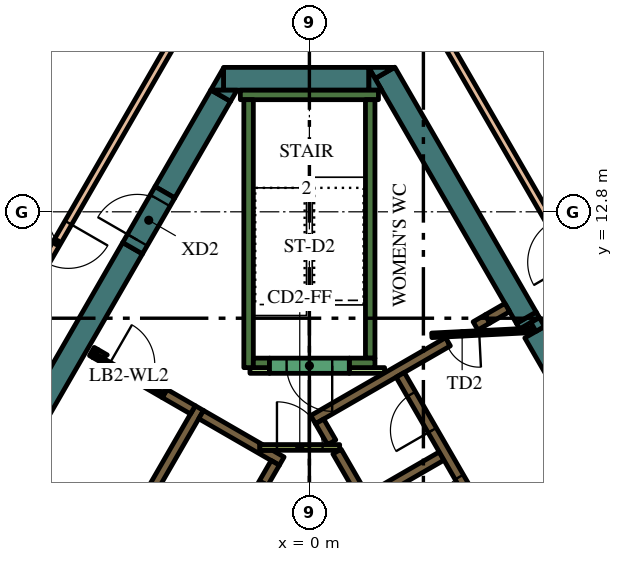
"""IFC4 building model, lengths in metres.
Left out: names, types, materials, properties, quantities, classifications, styles, units other than length and angle.
Written with IfcOpenShell. Run it as: python <this file> out.ifc"""

import sys

from ifc_helpers import new_model, si_unit, direction, frame, frame_2d, origin, place, context, subcontext, project, spatial, polyline, rectangle, outline, extrude, element, fill, save


model = new_model("IFC4")
c1 = context("Model", 3, precision=1e-05, world=origin(), true_north=direction((0.0, 1.0)))
c2 = subcontext(c1, "Body", "Model", "MODEL_VIEW")
j1 = project(units=[si_unit("LENGTHUNIT", "METRE"), si_unit("PLANEANGLEUNIT", "RADIAN")], contexts=[c1])
p1 = place(None, origin())
s1 = spatial("IfcSite", under=j1, at=p1, CompositionType="ELEMENT")
p2 = place(p1, origin())
s2 = spatial("IfcBuilding", under=s1, at=p2, CompositionType="ELEMENT")
p3 = place(p2, frame((0.0, 0.0, 336.0)))
s3 = spatial("IfcBuildingStorey", under=s2, at=p3, CompositionType="ELEMENT", Elevation=336.0)
p4 = place(p3, frame((5.709, 10.012, 0.0), z_axis=(0.0, 0.0, 1.0), x_axis=(0.500399834964, -0.865794435861, 0.0)))
e1 = element("IfcWall", 1, at=p4, inside=s3, PredefinedType="SOLIDWALL", context=c2, shape_type="SweptSolid", body=[
    extrude(rectangle(XDim=0.166, YDim=0.6, at=frame_2d((0.083, 0.0))), origin(), (0.0, 0.0, 1.0), 4.2),
])
p5 = place(p3, frame((5.928, 9.633, 0.0), z_axis=(0.0, 0.0, 1.0), x_axis=(0.499983823482, -0.8660347431, 0.0)))
e2 = element("IfcWall", 2, at=p5, inside=s3, PredefinedType="SOLIDWALL", context=c2, shape_type="SweptSolid", body=[
    extrude(rectangle(XDim=4.528, YDim=0.6, at=frame_2d((2.264, 0.0))), origin(), (0.0, 0.0, 1.0), 4.2),
])
p6 = place(p3, origin())
e3 = element("IfcWall", 3, at=p6, inside=s3, PredefinedType="SOLIDWALL", context=c2, shape_type="SweptSolid", body=[
    extrude(outline(polyline([(6.053, 10.016), (6.187, 9.784), (5.961, 9.654), (5.827, 9.886), (6.053, 10.016)])), origin(), (0.0, 0.0, 1.0), 4.2),
])
p7 = place(p3, frame((1.989, 16.456, 0.0), z_axis=(0.0, 0.0, 1.0), x_axis=(0.499990476767, -0.866030901956, 0.0)))
e4 = element("IfcWall", 4, at=p7, inside=s3, PredefinedType="SOLIDWALL", context=c2, shape_type="SweptSolid", body=[
    extrude(rectangle(XDim=7.438, YDim=0.6, at=frame_2d((3.719, 0.0))), origin(), (0.0, 0.0, 1.0), 4.2),
])
e5 = element("IfcWall", 5, at=p6, inside=s3, PredefinedType="SOLIDWALL", context=c2, shape_type="SweptSolid", body=[
    extrude(outline(polyline([(1.559, 16.6), (2.235, 16.6), (1.728, 16.307), (1.559, 16.6)])), origin(), (0.0, 0.0, 1.0), 4.2),
])
p8 = place(p3, frame((-2.258, 16.3, 0.0), z_axis=(0.0, 0.0, 1.0), x_axis=(1.0, 0.0, 0.0)))
e6 = element("IfcWall", 6, at=p8, inside=s3, PredefinedType="SOLIDWALL", context=c2, shape_type="SweptSolid", body=[
    extrude(rectangle(XDim=3.823, YDim=0.6, at=frame_2d((1.912, 0.0))), origin(), (0.0, 0.0, 1.0), 4.2),
])
e7 = element("IfcWall", 7, at=p6, inside=s3, PredefinedType="SOLIDWALL", context=c2, shape_type="SweptSolid", body=[
    extrude(outline(polyline([(1.905, 16.0), (1.567, 16.0), (1.567, 16.585), (1.905, 16.0)])), origin(), (0.0, 0.0, 1.0), 4.2),
])
e8 = element("IfcWall", 8, at=p6, inside=s3, PredefinedType="SOLIDWALL", context=c2, shape_type="SweptSolid", body=[
    extrude(outline(polyline([(-2.598, 16.0), (-2.26, 16.585), (-2.26, 16.0), (-2.598, 16.0)])), origin(), (0.0, 0.0, 1.0), 4.2),
])
p9 = place(p3, frame((-2.335, 15.855, 0.0), z_axis=(0.0, 0.0, 1.0), x_axis=(-0.499960127962, -0.866048422692, 0.0)))
e9 = element("IfcWall", 9, at=p9, inside=s3, PredefinedType="SOLIDWALL", context=c2, shape_type="SweptSolid", body=[
    extrude(rectangle(XDim=2.934, YDim=0.6, at=frame_2d((1.467, 0.0))), origin(), (0.0, 0.0, 1.0), 4.2),
])
e10 = element("IfcWall", 10, at=p6, inside=s3, PredefinedType="SOLIDWALL", context=c2, shape_type="SweptSolid", body=[
    extrude(outline(polyline([(-1.905, 16.0), (-2.074, 15.707), (-2.581, 16.0), (-1.905, 16.0)])), origin(), (0.0, 0.0, 1.0), 4.2),
])
p10 = place(p3, frame((-4.652, 11.842, 0.0), z_axis=(0.0, 0.0, 1.0), x_axis=(-0.500003640647, -0.866023301845, 0.0)))
e11 = element("IfcWall", 11, at=p10, inside=s3, PredefinedType="SOLIDWALL", context=c2, shape_type="SweptSolid", body=[
    extrude(rectangle(XDim=15.858, YDim=0.6, at=frame_2d((7.929, 0.0))), origin(), (0.0, 0.0, 1.0), 4.2),
])
p11 = place(p3, frame((-1.817, 15.875, 0.0), z_axis=(0.0, 0.0, 1.0), x_axis=(1.0, 0.0, 0.0)))
e12 = element("IfcWall", 12, at=p11, inside=s3, PredefinedType="SOLIDWALL", context=c2, shape_type="SweptSolid", body=[
    extrude(rectangle(XDim=3.634, YDim=0.25, at=frame_2d((1.817, 0.0))), origin(), (0.0, 0.0, 1.0), 4.2),
])
p12 = place(p3, frame((1.6, 8.95, 0.0), z_axis=(0.0, 0.0, 1.0), x_axis=(0.0, 1.0, 0.0)))
e13 = element("IfcWall", 13, at=p12, inside=s3, PredefinedType="SOLIDWALL", context=c2, shape_type="SweptSolid", body=[
    extrude(rectangle(XDim=6.8, YDim=0.25, at=frame_2d((3.4, 0.0))), origin(), (0.0, 0.0, 1.0), 4.2),
])
p13 = place(p3, frame((1.05, 8.825, 0.0), z_axis=(0.0, 0.0, 1.0), x_axis=(1.0, 0.0, 0.0)))
e14 = element("IfcWall", 14, at=p13, inside=s3, PredefinedType="SOLIDWALL", context=c2, shape_type="SweptSolid", body=[
    extrude(rectangle(XDim=0.675, YDim=0.25, at=frame_2d((0.337, 0.0))), origin(), (0.0, 0.0, 1.0), 4.2),
])
p14 = place(p3, frame((-1.6, 8.7, 0.0), z_axis=(0.0, 0.0, 1.0), x_axis=(0.0, 1.0, 0.0)))
e15 = element("IfcWall", 15, at=p14, inside=s3, PredefinedType="SOLIDWALL", context=c2, shape_type="SweptSolid", body=[
    extrude(rectangle(XDim=7.05, YDim=0.25, at=frame_2d((3.525, 0.0))), origin(), (0.0, 0.0, 1.0), 4.2),
])
p15 = place(p3, frame((-1.475, 8.825, 0.0), z_axis=(0.0, 0.0, 1.0), x_axis=(1.0, 0.0, 0.0)))
e16 = element("IfcWall", 16, at=p15, inside=s3, PredefinedType="SOLIDWALL", context=c2, shape_type="SweptSolid", body=[
    extrude(rectangle(XDim=0.425, YDim=0.25, at=frame_2d((0.212, 0.0))), origin(), (0.0, 0.0, 1.0), 4.2),
])
p16 = place(p3, frame((3.647, 9.38, 0.0), z_axis=(0.0, 0.0, 1.0), x_axis=(-0.866027868628, -0.499995730742, 0.0)))
e17 = element("IfcWall", 17, at=p16, inside=s3, PredefinedType="SOLIDWALL", context=c2, shape_type="SweptSolid", body=[
    extrude(rectangle(XDim=4.099, YDim=0.25, at=frame_2d((2.049, 0.0))), origin(), (0.0, 0.0, 1.0), 4.2),
])
p17 = place(p3, frame((0.268, 7.285, 0.0), z_axis=(0.0, 0.0, 1.0), x_axis=(0.500098681536, -0.865968422476, 0.0)))
e18 = element("IfcWall", 18, at=p17, inside=s3, PredefinedType="SOLIDWALL", context=c2, shape_type="SweptSolid", body=[
    extrude(rectangle(XDim=0.636, YDim=0.25, at=frame_2d((0.318, 0.0))), origin(), (0.0, 0.0, 1.0), 4.2),
])
p18 = place(p3, frame((5.97, -2.591, 0.0), z_axis=(0.0, 0.0, 1.0), x_axis=(-0.499994469932, 0.866028596547, 0.0)))
e19 = element("IfcWall", 19, at=p18, inside=s3, PredefinedType="SOLIDWALL", context=c2, shape_type="SweptSolid", body=[
    extrude(rectangle(XDim=10.488, YDim=0.25, at=frame_2d((5.244, 0.0))), origin(), (0.0, 0.0, 1.0), 4.2),
])
p19 = place(p3, frame((1.574, 5.274, 0.0), z_axis=(0.0, 0.0, 1.0), x_axis=(0.866028486751, 0.499994660107, 0.0)))
e20 = element("IfcWall", 20, at=p19, inside=s3, PredefinedType="SOLIDWALL", context=c2, shape_type="SweptSolid", body=[
    extrude(rectangle(XDim=2.2, YDim=0.25, at=frame_2d((1.1, 0.0))), origin(), (0.0, 0.0, 1.0), 4.2),
])
p20 = place(p3, frame((4.688, 9.981, 0.0), z_axis=(0.0, 0.0, 1.0), x_axis=(-0.865974312977, -0.500088481434, 0.0)))
e21 = element("IfcWall", 21, at=p20, inside=s3, PredefinedType="SOLIDWALL", context=c2, shape_type="SweptSolid", body=[
    extrude(rectangle(XDim=0.366, YDim=0.25, at=frame_2d((0.183, 0.0))), origin(), (0.0, 0.0, 1.0), 4.2),
])
p21 = place(p3, frame((4.689, 9.982, 0.0), z_axis=(0.0, 0.0, 1.0), x_axis=(0.865947592822, 0.500134748329, 0.0)))
e22 = element("IfcWall", 22, at=p21, inside=s3, PredefinedType="SOLIDWALL", context=c2, shape_type="SweptSolid", body=[
    extrude(rectangle(XDim=0.598, YDim=0.25, at=frame_2d((0.299, 0.0))), origin(), (0.0, 0.0, 1.0), 4.2),
])
p22 = place(p3, frame((-8.06, -1.311, 0.0), z_axis=(0.0, 0.0, 1.0), x_axis=(0.50000273126, 0.866023826885, 0.0)))
e23 = element("IfcWall", 23, at=p22, inside=s3, PredefinedType="SOLIDWALL", context=c2, shape_type="SweptSolid", body=[
    extrude(rectangle(XDim=10.33, YDim=0.25, at=frame_2d((5.165, 0.0))), origin(), (0.0, 0.0, 1.0), 4.2),
])
e24 = element("IfcWall", 24, at=p6, inside=s3, PredefinedType="SOLIDWALL", context=c2, shape_type="SweptSolid", body=[
    extrude(outline(polyline([(-2.912, 7.356), (-2.787, 7.573), (-1.232, 6.675), (-1.303, 6.675), (-1.304, 6.675), (-1.304, 6.675), (-1.304, 6.525), (-1.304, 6.525), (-1.303, 6.525), (-0.971, 6.525), (-0.665, 6.348), (-0.79, 6.132), (-1.007, 6.257), (-1.007, 6.257), (-2.912, 7.356)])), origin(), (0.0, 0.0, 1.0), 4.2),
])
p23 = place(p3, frame((-5.725, 9.125, 0.0), z_axis=(0.0, 0.0, 1.0), x_axis=(0.866185586049, -0.49972245349, 0.0)))
e25 = element("IfcWall", 25, at=p23, inside=s3, PredefinedType="SOLIDWALL", context=c2, shape_type="SweptSolid", body=[
    extrude(rectangle(XDim=0.11, YDim=0.25, at=frame_2d((0.055, 0.0))), origin(), (0.0, 0.0, 1.0), 4.2),
])
p24 = place(p3, frame((-3.066, 7.59, 0.0), z_axis=(0.0, 0.0, 1.0), x_axis=(-0.866081358704, 0.49990307071, 0.0)))
e26 = element("IfcWall", 26, at=p24, inside=s3, PredefinedType="SOLIDWALL", context=c2, shape_type="SweptSolid", body=[
    extrude(rectangle(XDim=0.858, YDim=0.25, at=frame_2d((0.429, 0.0))), origin(), (0.0, 0.0, 1.0), 4.2),
])
e27 = element("IfcWall", 27, at=p6, inside=s3, PredefinedType="SOLIDWALL", context=c2, shape_type="SweptSolid", body=[
    extrude(outline(polyline([(-3.748, 8.128), (-3.813, 8.015), (-4.027, 8.139), (-4.017, 8.156), (-4.008, 8.173), (-4.0, 8.192), (-3.995, 8.21), (-3.991, 8.23), (-3.99, 8.25), (-3.99, 8.268), (-3.748, 8.128)])), origin(), (0.0, 0.0, 1.0), 4.2),
])
e28 = element("IfcWall", 28, at=p6, inside=s3, PredefinedType="SOLIDWALL", context=c2, shape_type="SweptSolid", body=[
    extrude(outline(polyline([(-5.689, 8.96), (-5.69, 8.961), (-5.565, 9.177), (-5.319, 9.035), (-5.335, 9.026), (-5.351, 9.015), (-5.366, 9.002), (-5.379, 8.988), (-5.392, 8.972), (-5.402, 8.956), (-5.412, 8.939), (-5.629, 9.064), (-5.629, 9.064), (-5.689, 8.96)])), origin(), (0.0, 0.0, 1.0), 4.2),
])
p25 = place(p3, frame((1.05, 8.625, 0.0), z_axis=(0.0, 0.0, 1.0), x_axis=(1.0, 0.0, 0.0)))
e29 = element("IfcWall", 29, at=p25, inside=s3, PredefinedType="PARTITIONING", context=c2, shape_type="SweptSolid", body=[
    extrude(rectangle(XDim=0.929, YDim=0.15, at=frame_2d((0.464, 0.0))), origin(), (0.0, 0.0, 1.0), 3.45),
])
p26 = place(p3, frame((-1.564, 8.625, 0.0), z_axis=(0.0, 0.0, 1.0), x_axis=(1.0, 0.0, 0.0)))
e30 = element("IfcWall", 30, at=p26, inside=s3, PredefinedType="PARTITIONING", context=c2, shape_type="SweptSolid", body=[
    extrude(rectangle(XDim=0.514, YDim=0.15, at=frame_2d((0.257, 0.0))), origin(), (0.0, 0.0, 1.0), 3.45),
])
p27 = place(p3, frame((8.565, -2.185, 0.0), z_axis=(0.0, 0.0, 1.0), x_axis=(-0.499997954832, 0.866026584559, 0.0)))
e31 = element("IfcWall", 31, at=p27, inside=s3, PredefinedType="SOLIDWALL", context=c2, shape_type="SweptSolid", body=[
    extrude(rectangle(XDim=12.35, YDim=0.25, at=frame_2d((6.175, 0.0))), origin(), (0.0, 0.0, 1.0), 4.2),
])
p28 = place(p27, frame((0.685, 0.0, 0.0)))
e32 = element("IfcOpeningElement", 32, at=p28, cuts=e31, PredefinedType="OPENING", context=c2, shape_type="SweptSolid", body=[
    extrude(rectangle(XDim=0.9, YDim=2.1, at=frame_2d((0.45, 1.05))), frame((0.0, 0.135, 0.0), z_axis=(0.0, -1.0, 0.0), x_axis=(1.0, 0.0, 0.0)), (0.0, 0.0, 1.0), 0.27),
])
p29 = place(p27, frame((3.105, 0.0, 0.0)))
e33 = element("IfcOpeningElement", 33, at=p29, cuts=e31, PredefinedType="OPENING", context=c2, shape_type="SweptSolid", body=[
    extrude(rectangle(XDim=1.1, YDim=2.1, at=frame_2d((0.55, 1.05))), frame((0.0, 0.135, 0.0), z_axis=(0.0, -1.0, 0.0), x_axis=(1.0, 0.0, 0.0)), (0.0, 0.0, 1.0), 0.27),
])
p30 = place(p27, frame((5.625, 0.0, 0.0)))
e34 = element("IfcOpeningElement", 34, at=p30, cuts=e31, PredefinedType="OPENING", context=c2, shape_type="SweptSolid", body=[
    extrude(rectangle(XDim=1.1, YDim=2.1, at=frame_2d((0.55, 1.05))), frame((0.0, 0.135, 0.0), z_axis=(0.0, -1.0, 0.0), x_axis=(1.0, 0.0, 0.0)), (0.0, 0.0, 1.0), 0.27),
])
p31 = place(p27, frame((8.145, 0.0, 0.0)))
e35 = element("IfcOpeningElement", 35, at=p31, cuts=e31, PredefinedType="OPENING", context=c2, shape_type="SweptSolid", body=[
    extrude(rectangle(XDim=1.1, YDim=2.1, at=frame_2d((0.55, 1.05))), frame((0.0, 0.135, 0.0), z_axis=(0.0, -1.0, 0.0), x_axis=(1.0, 0.0, 0.0)), (0.0, 0.0, 1.0), 0.27),
])
p32 = place(p27, frame((10.665, 0.0, 0.0)))
e36 = element("IfcOpeningElement", 36, at=p32, cuts=e31, PredefinedType="OPENING", context=c2, shape_type="SweptSolid", body=[
    extrude(rectangle(XDim=1.1, YDim=2.1, at=frame_2d((0.55, 1.05))), frame((0.0, 0.135, 0.0), z_axis=(0.0, -1.0, 0.0), x_axis=(1.0, 0.0, 0.0)), (0.0, 0.0, 1.0), 0.27),
])
p33 = place(p3, frame((-0.898, 6.194, 0.0), z_axis=(0.0, 0.0, 1.0), x_axis=(-0.499996202215, -0.866027596426, 0.0)))
e37 = element("IfcWall", 37, at=p33, inside=s3, PredefinedType="SOLIDWALL", context=c2, shape_type="SweptSolid", body=[
    extrude(rectangle(XDim=9.83, YDim=0.25, at=frame_2d((4.915, 0.0))), origin(), (0.0, 0.0, 1.0), 4.2),
])
p34 = place(p33, frame((0.585, 0.0, 0.0)))
e38 = element("IfcOpeningElement", 38, at=p34, cuts=e37, PredefinedType="OPENING", context=c2, shape_type="SweptSolid", body=[
    extrude(rectangle(XDim=1.1, YDim=2.1, at=frame_2d((0.55, 1.05))), frame((0.0, 0.135, 0.0), z_axis=(0.0, -1.0, 0.0), x_axis=(1.0, 0.0, 0.0)), (0.0, 0.0, 1.0), 0.27),
])
p35 = place(p33, frame((3.105, 0.0, 0.0)))
e39 = element("IfcOpeningElement", 39, at=p35, cuts=e37, PredefinedType="OPENING", context=c2, shape_type="SweptSolid", body=[
    extrude(rectangle(XDim=1.1, YDim=2.1, at=frame_2d((0.55, 1.05))), frame((0.0, 0.135, 0.0), z_axis=(0.0, -1.0, 0.0), x_axis=(1.0, 0.0, 0.0)), (0.0, 0.0, 1.0), 0.27),
])
p36 = place(p33, frame((5.625, 0.0, 0.0)))
e40 = element("IfcOpeningElement", 40, at=p36, cuts=e37, PredefinedType="OPENING", context=c2, shape_type="SweptSolid", body=[
    extrude(rectangle(XDim=1.1, YDim=2.1, at=frame_2d((0.55, 1.05))), frame((0.0, 0.135, 0.0), z_axis=(0.0, -1.0, 0.0), x_axis=(1.0, 0.0, 0.0)), (0.0, 0.0, 1.0), 0.27),
])
p37 = place(p33, frame((8.145, 0.0, 0.0)))
e41 = element("IfcOpeningElement", 41, at=p37, cuts=e37, PredefinedType="OPENING", context=c2, shape_type="SweptSolid", body=[
    extrude(rectangle(XDim=1.1, YDim=2.1, at=frame_2d((0.55, 1.05))), frame((0.0, 0.135, 0.0), z_axis=(0.0, -1.0, 0.0), x_axis=(1.0, 0.0, 0.0)), (0.0, 0.0, 1.0), 0.27),
])
p38 = place(p3, frame((1.05, 8.75, 0.0), z_axis=(0.0, 0.0, 1.0), x_axis=(-1.0, 0.0, 0.0)))
e42 = element("IfcWall", 42, at=p38, inside=s3, PredefinedType="SOLIDWALL", context=c2, shape_type="SweptSolid", body=[
    extrude(rectangle(XDim=2.1, YDim=0.4, at=frame_2d((1.05, 0.0))), origin(), (0.0, 0.0, 1.0), 4.2),
])
p39 = place(p38, frame((0.45, 0.0, 0.0)))
e43 = element("IfcOpeningElement", 43, at=p39, cuts=e42, PredefinedType="OPENING", context=c2, shape_type="SweptSolid", body=[
    extrude(rectangle(XDim=1.2, YDim=2.1, at=frame_2d((0.6, 1.05))), frame((0.0, 0.21, 0.0), z_axis=(0.0, -1.0, 0.0), x_axis=(1.0, 0.0, 0.0)), (0.0, 0.0, 1.0), 0.42),
])
p40 = place(p3, frame((5.917, 9.684, 0.0), z_axis=(0.0, 0.0, 1.0), x_axis=(-0.998758194515, -0.049820366212, 0.0)))
e44 = element("IfcWall", 44, at=p40, inside=s3, PredefinedType="PARTITIONING", context=c2, shape_type="SweptSolid", body=[
    extrude(rectangle(XDim=2.7, YDim=0.12, at=frame_2d((1.35, 0.0))), origin(), (0.0, 0.0, 1.0), 3.45),
])
p41 = place(p40, frame((1.45, 0.0, 0.0)))
e45 = element("IfcOpeningElement", 45, at=p41, cuts=e44, PredefinedType="OPENING", context=c2, shape_type="SweptSolid", body=[
    extrude(rectangle(XDim=0.9, YDim=2.1, at=frame_2d((0.45, 1.05))), frame((0.0, 0.07, 0.0), z_axis=(0.0, -1.0, 0.0), x_axis=(1.0, 0.0, 0.0)), (0.0, 0.0, 1.0), 0.14),
])
p42 = place(p3, frame((-1.303, 6.6, 0.0), z_axis=(0.0, 0.0, 1.0), x_axis=(1.0, 0.0, 0.0)))
e46 = element("IfcWall", 46, at=p42, inside=s3, PredefinedType="PARTITIONING", context=c2, shape_type="SweptSolid", body=[
    extrude(rectangle(XDim=2.1, YDim=0.15, at=frame_2d((1.05, 0.0))), origin(), (0.0, 0.0, 1.0), 4.2),
])
p43 = place(p42, frame((0.45, 0.0, 0.0)))
e47 = element("IfcOpeningElement", 47, at=p43, cuts=e46, PredefinedType="OPENING", context=c2, shape_type="SweptSolid", body=[
    extrude(rectangle(XDim=1.2, YDim=2.1, at=frame_2d((0.6, 1.05))), frame((0.0, 0.085, 0.0), z_axis=(0.0, -1.0, 0.0), x_axis=(1.0, 0.0, 0.0)), (0.0, 0.0, 1.0), 0.17),
])
p44 = place(p3, frame((-5.659, 9.012, 0.0), z_axis=(0.0, 0.0, 1.0), x_axis=(0.866009402589, -0.500027713859, 0.0)))
e48 = element("IfcWall", 48, at=p44, inside=s3, PredefinedType="PARTITIONING", context=c2, shape_type="SweptSolid", body=[
    extrude(rectangle(XDim=2.1, YDim=0.12, at=frame_2d((1.05, 0.0))), origin(), (0.0, 0.0, 1.0), 3.45),
])
p45 = place(p44, frame((0.45, 0.0, 0.0)))
e49 = element("IfcOpeningElement", 49, at=p45, cuts=e48, PredefinedType="OPENING", context=c2, shape_type="SweptSolid", body=[
    extrude(rectangle(XDim=1.2, YDim=2.1, at=frame_2d((0.6, 1.05))), frame((0.0, 0.07, 0.0), z_axis=(0.0, -1.0, 0.0), x_axis=(1.0, 0.0, 0.0)), (0.0, 0.0, 1.0), 0.14),
])
p46 = place(p3, frame((-4.652, 11.842, 0.0), z_axis=(0.0, 0.0, 1.0), x_axis=(0.500062241894, 0.865989465428, 0.0)))
e50 = element("IfcWall", 50, at=p46, inside=s3, PredefinedType="SOLIDWALL", context=c2, shape_type="SweptSolid", body=[
    extrude(rectangle(XDim=1.7, YDim=0.6, at=frame_2d((0.85, 0.0))), origin(), (0.0, 0.0, 1.0), 4.2),
])
p47 = place(p46, frame((0.25, 0.0, 0.0)))
e51 = element("IfcOpeningElement", 51, at=p47, cuts=e50, PredefinedType="OPENING", context=c2, shape_type="SweptSolid", body=[
    extrude(rectangle(XDim=1.2, YDim=2.1, at=frame_2d((0.6, 1.05))), frame((0.0, 0.31, 0.0), z_axis=(0.0, -1.0, 0.0), x_axis=(1.0, 0.0, 0.0)), (0.0, 0.0, 1.0), 0.62),
])
p48 = place(p3, frame((-3.118, 18.1, 0.0), z_axis=(0.0, 0.0, 1.0), x_axis=(-0.499999609035, -0.866025629508, 0.0)))
e52 = element("IfcWall", 52, at=p48, inside=s3, PredefinedType="PARTITIONING", context=c2, shape_type="SweptSolid", body=[
    extrude(rectangle(XDim=14.106, YDim=0.2, at=frame_2d((7.053, 0.0))), origin(), (0.0, 0.0, 1.0), 3.45),
])
p49 = place(p48, frame((6.453, 0.0, 0.0)))
e53 = element("IfcOpeningElement", 53, at=p49, cuts=e52, PredefinedType="OPENING", context=c2, shape_type="SweptSolid", body=[
    extrude(rectangle(XDim=1.2, YDim=2.1, at=frame_2d((0.6, 1.05))), frame((0.0, 0.11, 0.0), z_axis=(0.0, -1.0, 0.0), x_axis=(1.0, 0.0, 0.0)), (0.0, 0.0, 1.0), 0.22),
])
p50 = place(p3, frame((10.171, 5.884, 0.0), z_axis=(0.0, 0.0, 1.0), x_axis=(-0.499999609035, 0.866025629508, 0.0)))
e54 = element("IfcWall", 54, at=p50, inside=s3, PredefinedType="PARTITIONING", context=c2, shape_type="SweptSolid", body=[
    extrude(rectangle(XDim=14.106, YDim=0.2, at=frame_2d((7.053, 0.0))), origin(), (0.0, 0.0, 1.0), 3.45),
])
p51 = place(p50, frame((6.453, 0.0, 0.0)))
e55 = element("IfcOpeningElement", 55, at=p51, cuts=e54, PredefinedType="OPENING", context=c2, shape_type="SweptSolid", body=[
    extrude(rectangle(XDim=1.2, YDim=2.1, at=frame_2d((0.6, 1.05))), frame((0.0, 0.11, 0.0), z_axis=(0.0, -1.0, 0.0), x_axis=(1.0, 0.0, 0.0)), (0.0, 0.0, 1.0), 0.22),
])
p52 = place(p3, frame((-6.808, 17.908, 0.0), z_axis=(0.0, 0.0, 1.0), x_axis=(-0.499977492351, -0.866038398192, 0.0)))
e56 = element("IfcWall", 56, at=p52, inside=s3, PredefinedType="SOLIDWALL", context=c2, shape_type="SweptSolid", body=[
    extrude(rectangle(XDim=1.464, YDim=0.3, at=frame_2d((0.732, 0.0))), origin(), (0.0, 0.0, 1.0), 3.95),
])
p53 = place(p31, origin())
e57 = element("IfcDoor", 57, at=p53, inside=s3, OperationType="DOUBLE_DOOR_SLIDING", PredefinedType="DOOR", context=c2, shape_type="SweptSolid", body=[
    extrude(rectangle(XDim=1.1, YDim=2.1, at=frame_2d((0.55, 1.05))), frame((0.0, 0.025, 0.0), z_axis=(0.0, -1.0, 0.0), x_axis=(1.0, 0.0, 0.0)), (0.0, 0.0, 1.0), 0.05),
])
fill(e35, e57)
p54 = place(p32, origin())
e58 = element("IfcDoor", 58, at=p54, inside=s3, OperationType="DOUBLE_DOOR_SLIDING", PredefinedType="DOOR", context=c2, shape_type="SweptSolid", body=[
    extrude(rectangle(XDim=1.1, YDim=2.1, at=frame_2d((0.55, 1.05))), frame((0.0, 0.025, 0.0), z_axis=(0.0, -1.0, 0.0), x_axis=(1.0, 0.0, 0.0)), (0.0, 0.0, 1.0), 0.05),
])
fill(e36, e58)
p55 = place(p34, origin())
e59 = element("IfcDoor", 59, at=p55, inside=s3, OperationType="DOUBLE_DOOR_SLIDING", PredefinedType="DOOR", context=c2, shape_type="SweptSolid", body=[
    extrude(rectangle(XDim=1.1, YDim=2.1, at=frame_2d((0.55, 1.05))), frame((0.0, 0.025, 0.0), z_axis=(0.0, -1.0, 0.0), x_axis=(1.0, 0.0, 0.0)), (0.0, 0.0, 1.0), 0.05),
])
fill(e38, e59)
p56 = place(p39, origin())
e60 = element("IfcDoor", 60, at=p56, inside=s3, OperationType="SINGLE_SWING_LEFT", PredefinedType="DOOR", context=c2, shape_type="SweptSolid", body=[
    extrude(rectangle(XDim=1.2, YDim=2.1, at=frame_2d((0.6, 1.05))), frame((0.0, 0.025, 0.0), z_axis=(0.0, -1.0, 0.0), x_axis=(1.0, 0.0, 0.0)), (0.0, 0.0, 1.0), 0.05),
])
fill(e43, e60)
p57 = place(p41, origin())
e61 = element("IfcDoor", 61, at=p57, inside=s3, OperationType="SINGLE_SWING_LEFT", PredefinedType="DOOR", context=c2, shape_type="SweptSolid", body=[
    extrude(rectangle(XDim=0.9, YDim=2.1, at=frame_2d((0.45, 1.05))), frame((0.0, 0.025, 0.0), z_axis=(0.0, -1.0, 0.0), x_axis=(1.0, 0.0, 0.0)), (0.0, 0.0, 1.0), 0.05),
])
fill(e45, e61)
p58 = place(p43, origin())
e62 = element("IfcDoor", 62, at=p58, inside=s3, OperationType="SINGLE_SWING_LEFT", PredefinedType="DOOR", context=c2, shape_type="SweptSolid", body=[
    extrude(rectangle(XDim=1.2, YDim=2.1, at=frame_2d((0.6, 1.05))), frame((0.0, 0.025, 0.0), z_axis=(0.0, -1.0, 0.0), x_axis=(1.0, 0.0, 0.0)), (0.0, 0.0, 1.0), 0.05),
])
fill(e47, e62)
p59 = place(p45, origin())
e63 = element("IfcDoor", 63, at=p59, inside=s3, OperationType="SINGLE_SWING_LEFT", PredefinedType="DOOR", context=c2, shape_type="SweptSolid", body=[
    extrude(rectangle(XDim=1.2, YDim=2.1, at=frame_2d((0.6, 1.05))), frame((0.0, 0.025, 0.0), z_axis=(0.0, -1.0, 0.0), x_axis=(1.0, 0.0, 0.0)), (0.0, 0.0, 1.0), 0.05),
])
fill(e49, e63)
p60 = place(p47, origin())
e64 = element("IfcDoor", 64, at=p60, inside=s3, OperationType="SINGLE_SWING_LEFT", PredefinedType="DOOR", context=c2, shape_type="SweptSolid", body=[
    extrude(rectangle(XDim=1.2, YDim=2.1, at=frame_2d((0.6, 1.05))), frame((0.0, 0.025, 0.0), z_axis=(0.0, -1.0, 0.0), x_axis=(1.0, 0.0, 0.0)), (0.0, 0.0, 1.0), 0.05),
])
fill(e51, e64)
p61 = place(p49, origin())
e65 = element("IfcDoor", 65, at=p61, inside=s3, OperationType="SINGLE_SWING_RIGHT", PredefinedType="DOOR", context=c2, shape_type="SweptSolid", body=[
    extrude(rectangle(XDim=1.2, YDim=2.1, at=frame_2d((0.6, 1.05))), frame((0.0, 0.025, 0.0), z_axis=(0.0, -1.0, 0.0), x_axis=(1.0, 0.0, 0.0)), (0.0, 0.0, 1.0), 0.05),
])
fill(e53, e65)
save(model, sys.argv[1])
